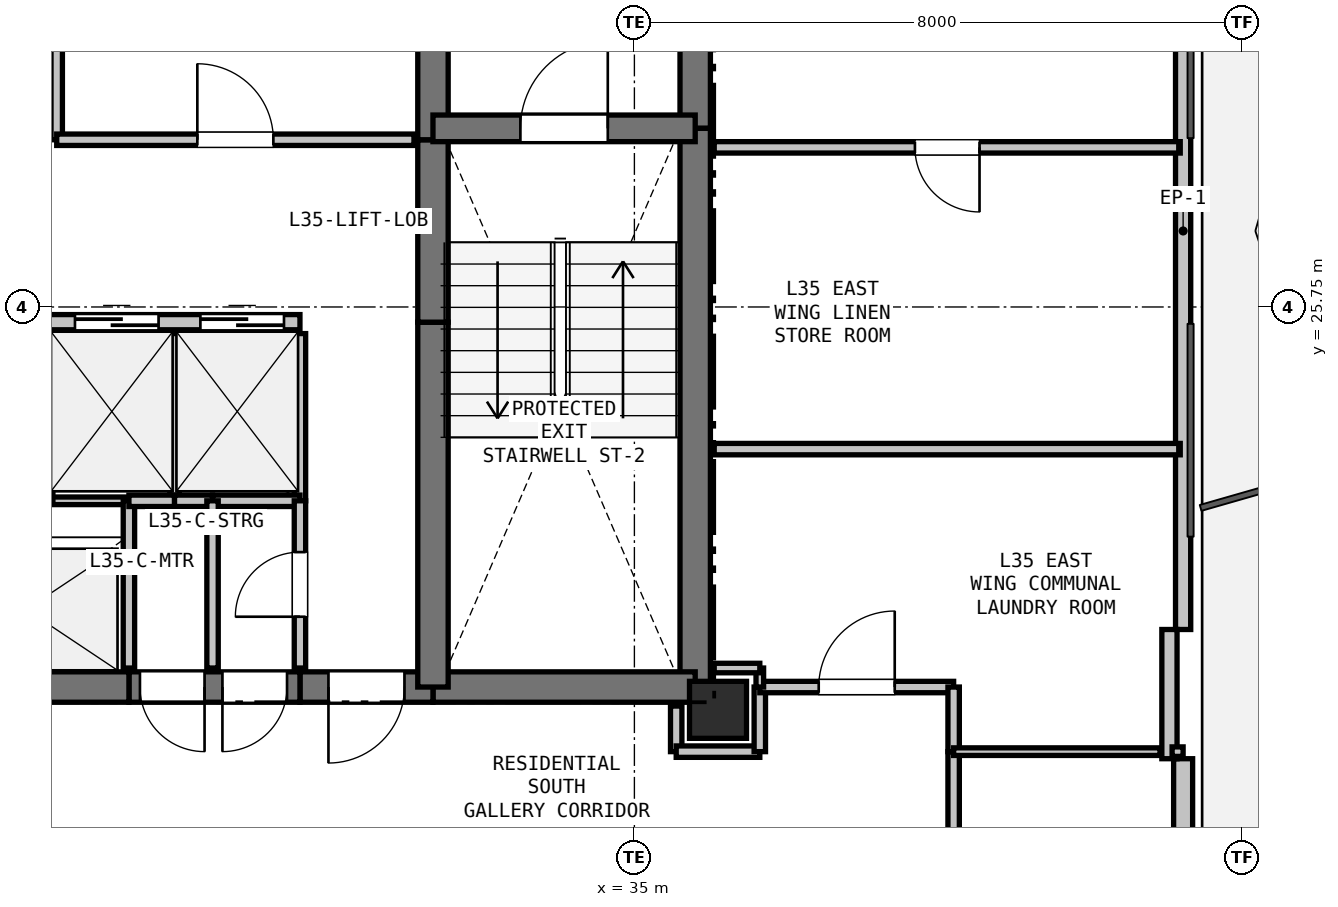
"""IFC4 building model, lengths in metres.
Left out: names, types, materials, properties, quantities, classifications, styles, units other than length and angle.
Written with IfcOpenShell. Run it as: python <this file> out.ifc"""

import sys

from ifc_helpers import new_model, si_unit, direction, frame, frame_2d, origin, origin_2d, place, context, subcontext, project, spatial, rectangle, extrude, element, fill, save


model = new_model("IFC4")
c1 = context("Model", 3, precision=1e-05, world=origin(), true_north=direction((0.0, 1.0)))
c2 = subcontext(c1, "Body", "Model", "MODEL_VIEW")
j1 = project(units=[si_unit("LENGTHUNIT", "METRE"), si_unit("PLANEANGLEUNIT", "RADIAN")], contexts=[c1])
p1 = place(None, origin())
s1 = spatial("IfcSite", under=j1, at=p1, CompositionType="ELEMENT")
p2 = place(p1, origin())
s2 = spatial("IfcBuilding", under=s1, at=p2, CompositionType="ELEMENT")
p3 = place(p2, frame((0.0, 0.0, 127.8)))
s3 = spatial("IfcBuildingStorey", under=s2, at=p3, CompositionType="ELEMENT", Elevation=127.8)
p4 = place(p3, frame((36.1, 20.45, 0.0), z_axis=(0.0, 0.0, 1.0), x_axis=(1.0, 0.0, 0.0)))
e1 = element("IfcColumn", 1, at=p4, inside=s3, PredefinedType="COLUMN", context=c2, shape_type="SweptSolid", body=[
    extrude(rectangle(XDim=0.75, YDim=0.75, at=origin_2d()), origin(), (0.0, 0.0, 1.0), 3.3),
])
p5 = place(p3, frame((42.219, 31.993, 0.0), z_axis=(0.0, 0.0, 1.0), x_axis=(0.0, -1.0, 0.0)))
e2 = element("IfcWall", 2, at=p5, inside=s3, PredefinedType="PARAPET", context=c2, shape_type="SweptSolid", body=[
    extrude(rectangle(XDim=10.486, YDim=0.2, at=frame_2d((5.243, 0.0))), origin(), (0.0, 0.0, 1.0), 0.2),
])
p6 = place(p3, frame((42.219, 19.807, 0.0), z_axis=(0.0, 0.0, 1.0), x_axis=(0.0, -1.0, 0.0)))
e3 = element("IfcWall", 3, at=p6, inside=s3, PredefinedType="SOLIDWALL", context=c2, shape_type="SweptSolid", body=[
    extrude(rectangle(XDim=11.186, YDim=0.25, at=frame_2d((5.593, 0.0))), origin(), (0.0, 0.0, 1.0), 2.68),
])
p7 = place(p6, frame((9.277, 0.0, 0.9)))
e4 = element("IfcOpeningElement", 4, at=p7, cuts=e3, PredefinedType="OPENING", context=c2, shape_type="SweptSolid", body=[
    extrude(rectangle(XDim=1.2, YDim=1.4, at=frame_2d((0.6, 0.7))), frame((0.0, 0.135, 0.0), z_axis=(0.0, -1.0, 0.0), x_axis=(1.0, 0.0, 0.0)), (0.0, 0.0, 1.0), 0.27),
])
p8 = place(p3, frame((42.039, 21.507, 0.0), z_axis=(0.0, 0.0, 1.0), x_axis=(0.0, -1.0, 0.0)))
e5 = element("IfcWall", 5, at=p8, inside=s3, PredefinedType="PARAPET", context=c2, shape_type="SweptSolid", body=[
    extrude(rectangle(XDim=1.7, YDim=0.2, at=frame_2d((0.85, 0.0))), origin(), (0.0, 0.0, 1.0), 2.68),
])
p9 = place(p3, frame((35.8, 32.75, 0.0), z_axis=(0.0, 0.0, 1.0), x_axis=(0.0, -1.0, 0.0)))
e6 = element("IfcWall", 6, at=p9, inside=s3, PredefinedType="SHEAR", context=c2, shape_type="SweptSolid", body=[
    extrude(rectangle(XDim=4.65, YDim=0.4, at=frame_2d((2.325, 0.0))), origin(), (0.0, 0.0, 1.0), 3.06),
])
p10 = place(p3, frame((35.8, 28.1, 0.0), z_axis=(0.0, 0.0, 1.0), x_axis=(0.0, -1.0, 0.0)))
e7 = element("IfcWall", 7, at=p10, inside=s3, PredefinedType="SHEAR", context=c2, shape_type="SweptSolid", body=[
    extrude(rectangle(XDim=7.35, YDim=0.4, at=frame_2d((3.675, 0.0))), origin(), (0.0, 0.0, 1.0), 3.06),
])
p11 = place(p3, frame((35.8, 20.75, 0.0), z_axis=(0.0, 0.0, 1.0), x_axis=(-1.0, 0.0, 0.0)))
e8 = element("IfcWall", 8, at=p11, inside=s3, PredefinedType="SHEAR", context=c2, shape_type="SweptSolid", body=[
    extrude(rectangle(XDim=3.45, YDim=0.4, at=frame_2d((1.725, 0.0))), origin(), (0.0, 0.0, 1.0), 3.06),
])
p12 = place(p3, frame((32.35, 20.75, 0.0), z_axis=(0.0, 0.0, 1.0), x_axis=(-1.0, 0.0, 0.0)))
e9 = element("IfcWall", 9, at=p12, inside=s3, PredefinedType="SHEAR", context=c2, shape_type="SweptSolid", body=[
    extrude(rectangle(XDim=1.75, YDim=0.4, at=frame_2d((0.875, 0.0))), origin(), (0.0, 0.0, 1.0), 3.06),
])
p13 = place(p12, frame((0.375, 0.0, 0.0)))
e10 = element("IfcOpeningElement", 10, at=p13, cuts=e9, PredefinedType="OPENING", context=c2, shape_type="SweptSolid", body=[
    extrude(rectangle(XDim=1.0, YDim=2.15, at=frame_2d((0.5, 1.075))), frame((0.0, 0.21, 0.0), z_axis=(0.0, -1.0, 0.0), x_axis=(1.0, 0.0, 0.0)), (0.0, 0.0, 1.0), 0.42),
])
p14 = place(p3, frame((30.6, 20.75, 0.0), z_axis=(0.0, 0.0, 1.0), x_axis=(-1.0, 0.0, 0.0)))
e11 = element("IfcWall", 11, at=p14, inside=s3, PredefinedType="SHEAR", context=c2, shape_type="SweptSolid", body=[
    extrude(rectangle(XDim=2.25, YDim=0.4, at=frame_2d((1.125, 0.0))), origin(), (0.0, 0.0, 1.0), 3.06),
])
p15 = place(p14, frame((1.255, 0.0, 0.0)))
e12 = element("IfcOpeningElement", 12, at=p15, cuts=e11, PredefinedType="OPENING", context=c2, shape_type="SweptSolid", body=[
    extrude(rectangle(XDim=0.85, YDim=2.1, at=frame_2d((0.425, 1.05))), frame((0.0, 0.21, 0.0), z_axis=(0.0, -1.0, 0.0), x_axis=(1.0, 0.0, 0.0)), (0.0, 0.0, 1.0), 0.42),
])
p16 = place(p14, frame((0.17, 0.0, 0.0)))
e13 = element("IfcOpeningElement", 13, at=p16, cuts=e11, PredefinedType="OPENING", context=c2, shape_type="SweptSolid", body=[
    extrude(rectangle(XDim=0.85, YDim=2.1, at=frame_2d((0.425, 1.05))), frame((0.0, 0.21, 0.0), z_axis=(0.0, -1.0, 0.0), x_axis=(1.0, 0.0, 0.0)), (0.0, 0.0, 1.0), 0.42),
])
p17 = place(p3, frame((28.35, 20.75, 0.0), z_axis=(0.0, 0.0, 1.0), x_axis=(-1.0, 0.0, 0.0)))
e14 = element("IfcWall", 14, at=p17, inside=s3, PredefinedType="SHEAR", context=c2, shape_type="SweptSolid", body=[
    extrude(rectangle(XDim=2.7, YDim=0.4, at=frame_2d((1.35, 0.0))), origin(), (0.0, 0.0, 1.0), 3.06),
])
p18 = place(p3, frame((32.35, 20.75, 0.0), z_axis=(0.0, 0.0, 1.0), x_axis=(0.0, 1.0, 0.0)))
e15 = element("IfcWall", 15, at=p18, inside=s3, PredefinedType="SHEAR", context=c2, shape_type="SweptSolid", body=[
    extrude(rectangle(XDim=4.8, YDim=0.4, at=frame_2d((2.4, 0.0))), origin(), (0.0, 0.0, 1.0), 3.06),
])
p19 = place(p3, frame((32.35, 25.55, 0.0), z_axis=(0.0, 0.0, 1.0), x_axis=(0.0, 1.0, 0.0)))
e16 = element("IfcWall", 16, at=p19, inside=s3, PredefinedType="SHEAR", context=c2, shape_type="SweptSolid", body=[
    extrude(rectangle(XDim=2.4, YDim=0.4, at=frame_2d((1.2, 0.0))), origin(), (0.0, 0.0, 1.0), 3.06),
])
p20 = place(p3, frame((32.35, 27.95, 0.0), z_axis=(0.0, 0.0, 1.0), x_axis=(0.0, 1.0, 0.0)))
e17 = element("IfcWall", 17, at=p20, inside=s3, PredefinedType="SHEAR", context=c2, shape_type="SweptSolid", body=[
    extrude(rectangle(XDim=2.8, YDim=0.4, at=frame_2d((1.4, 0.0))), origin(), (0.0, 0.0, 1.0), 3.06),
])
p21 = place(p3, frame((32.35, 28.1, 0.0), z_axis=(0.0, 0.0, 1.0), x_axis=(1.0, 0.0, 0.0)))
e18 = element("IfcWall", 18, at=p21, inside=s3, PredefinedType="SHEAR", context=c2, shape_type="SweptSolid", body=[
    extrude(rectangle(XDim=3.45, YDim=0.35, at=frame_2d((1.725, 0.0))), origin(), (0.0, 0.0, 1.0), 3.06),
])
p22 = place(p21, frame((1.15, 0.0, 0.0)))
e19 = element("IfcOpeningElement", 19, at=p22, cuts=e18, PredefinedType="OPENING", context=c2, shape_type="SweptSolid", body=[
    extrude(rectangle(XDim=1.15, YDim=2.15, at=frame_2d((0.575, 1.075))), frame((0.0, 0.185, 0.0), z_axis=(0.0, -1.0, 0.0), x_axis=(1.0, 0.0, 0.0)), (0.0, 0.0, 1.0), 0.37),
])
p23 = place(p3, frame((25.65, 25.55, 0.0), z_axis=(0.0, 0.0, 1.0), x_axis=(1.0, 0.0, 0.0)))
e20 = element("IfcWall", 20, at=p23, inside=s3, PredefinedType="PARTITIONING", context=c2, shape_type="SweptSolid", body=[
    extrude(rectangle(XDim=4.95, YDim=0.2, at=frame_2d((2.475, 0.0))), origin(), (0.0, 0.0, 1.0), 3.06),
])
p24 = place(p23, frame((0.34, 0.0, 0.0)))
e21 = element("IfcOpeningElement", 21, at=p24, cuts=e20, PredefinedType="OPENING", context=c2, shape_type="SweptSolid", body=[
    extrude(rectangle(XDim=1.1, YDim=2.15, at=frame_2d((0.55, 1.075))), frame((0.0, 0.11, 0.0), z_axis=(0.0, -1.0, 0.0), x_axis=(1.0, 0.0, 0.0)), (0.0, 0.0, 1.0), 0.22),
])
p25 = place(p23, frame((1.99, 0.0, 0.0)))
e22 = element("IfcOpeningElement", 22, at=p25, cuts=e20, PredefinedType="OPENING", context=c2, shape_type="SweptSolid", body=[
    extrude(rectangle(XDim=1.1, YDim=2.15, at=frame_2d((0.55, 1.075))), frame((0.0, 0.11, 0.0), z_axis=(0.0, -1.0, 0.0), x_axis=(1.0, 0.0, 0.0)), (0.0, 0.0, 1.0), 0.22),
])
p26 = place(p23, frame((3.64, 0.0, 0.0)))
e23 = element("IfcOpeningElement", 23, at=p26, cuts=e20, PredefinedType="OPENING", context=c2, shape_type="SweptSolid", body=[
    extrude(rectangle(XDim=1.1, YDim=2.15, at=frame_2d((0.55, 1.075))), frame((0.0, 0.11, 0.0), z_axis=(0.0, -1.0, 0.0), x_axis=(1.0, 0.0, 0.0)), (0.0, 0.0, 1.0), 0.22),
])
p27 = place(p3, frame((27.3, 23.2, 0.0), z_axis=(0.0, 0.0, 1.0), x_axis=(1.0, 0.0, 0.0)))
e24 = element("IfcWall", 24, at=p27, inside=s3, PredefinedType="PARTITIONING", context=c2, shape_type="SweptSolid", body=[
    extrude(rectangle(XDim=1.05, YDim=0.1, at=frame_2d((0.525, 0.0))), origin(), (0.0, 0.0, 1.0), 3.06),
])
p28 = place(p3, frame((28.35, 23.2, 0.0), z_axis=(0.0, 0.0, 1.0), x_axis=(0.0, -1.0, 0.0)))
e25 = element("IfcWall", 25, at=p28, inside=s3, PredefinedType="PARTITIONING", context=c2, shape_type="SweptSolid", body=[
    extrude(rectangle(XDim=2.2, YDim=0.15, at=frame_2d((1.1, 0.0))), origin(), (0.0, 0.0, 1.0), 3.06),
])
p29 = place(p3, frame((28.95, 25.4, 0.0), z_axis=(0.0, 0.0, 1.0), x_axis=(0.0, -1.0, 0.0)))
e26 = element("IfcWall", 26, at=p29, inside=s3, PredefinedType="PARTITIONING", context=c2, shape_type="SweptSolid", body=[
    extrude(rectangle(XDim=2.2, YDim=0.125, at=frame_2d((1.1, 0.0))), origin(), (0.0, 0.0, 1.0), 3.06),
])
p30 = place(p3, frame((28.95, 23.2, 0.0), z_axis=(0.0, 0.0, 1.0), x_axis=(-1.0, 0.0, 0.0)))
e27 = element("IfcWall", 27, at=p30, inside=s3, PredefinedType="PARTITIONING", context=c2, shape_type="SweptSolid", body=[
    extrude(rectangle(XDim=0.6, YDim=0.15, at=frame_2d((0.3, 0.0))), origin(), (0.0, 0.0, 1.0), 3.06),
])
p31 = place(p3, frame((30.6, 25.4, 0.0), z_axis=(0.0, 0.0, 1.0), x_axis=(0.0, -1.0, 0.0)))
e28 = element("IfcWall", 28, at=p31, inside=s3, PredefinedType="PARTITIONING", context=c2, shape_type="SweptSolid", body=[
    extrude(rectangle(XDim=2.2, YDim=0.15, at=frame_2d((1.1, 0.0))), origin(), (0.0, 0.0, 1.0), 3.06),
])
p32 = place(p3, frame((30.6, 23.2, 0.0), z_axis=(0.0, 0.0, 1.0), x_axis=(-1.0, 0.0, 0.0)))
e29 = element("IfcWall", 29, at=p32, inside=s3, PredefinedType="PARTITIONING", context=c2, shape_type="SweptSolid", body=[
    extrude(rectangle(XDim=1.15, YDim=0.15, at=frame_2d((0.575, 0.0))), origin(), (0.0, 0.0, 1.0), 3.06),
])
p33 = place(p3, frame((29.45, 23.2, 0.0), z_axis=(0.0, 0.0, 1.0), x_axis=(-1.0, 0.0, 0.0)))
e30 = element("IfcWall", 30, at=p33, inside=s3, PredefinedType="PARTITIONING", context=c2, shape_type="SweptSolid", body=[
    extrude(rectangle(XDim=0.5, YDim=0.15, at=frame_2d((0.25, 0.0))), origin(), (0.0, 0.0, 1.0), 3.06),
])
p34 = place(p3, frame((30.6, 21.0, 0.0), z_axis=(0.0, 0.0, 1.0), x_axis=(0.0, 1.0, 0.0)))
e31 = element("IfcWall", 31, at=p34, inside=s3, PredefinedType="PARTITIONING", context=c2, shape_type="SweptSolid", body=[
    extrude(rectangle(XDim=2.2, YDim=0.15, at=frame_2d((1.1, 0.0))), origin(), (0.0, 0.0, 1.0), 3.06),
])
p35 = place(p34, frame((0.675, 0.0, 0.0)))
e32 = element("IfcOpeningElement", 32, at=p35, cuts=e31, PredefinedType="OPENING", context=c2, shape_type="SweptSolid", body=[
    extrude(rectangle(XDim=0.85, YDim=2.1, at=frame_2d((0.425, 1.05))), frame((0.0, 0.085, 0.0), z_axis=(0.0, -1.0, 0.0), x_axis=(1.0, 0.0, 0.0)), (0.0, 0.0, 1.0), 0.17),
])
p36 = place(p3, frame((27.4, 30.3, 0.0), z_axis=(0.0, 0.0, 1.0), x_axis=(0.0, -1.0, 0.0)))
e33 = element("IfcWall", 33, at=p36, inside=s3, PredefinedType="PARTITIONING", context=c2, shape_type="SweptSolid", body=[
    extrude(rectangle(XDim=2.35, YDim=0.15, at=frame_2d((1.175, 0.0))), origin(), (0.0, 0.0, 1.0), 3.06),
])
p37 = place(p3, frame((27.4, 27.95, 0.0), z_axis=(0.0, 0.0, 1.0), x_axis=(1.0, 0.0, 0.0)))
e34 = element("IfcWall", 34, at=p37, inside=s3, PredefinedType="PARTITIONING", context=c2, shape_type="SweptSolid", body=[
    extrude(rectangle(XDim=4.7, YDim=0.15, at=frame_2d((2.35, 0.0))), origin(), (0.0, 0.0, 1.0), 3.06),
])
p38 = place(p37, frame((1.85, 0.0, 0.0)))
e35 = element("IfcOpeningElement", 35, at=p38, cuts=e34, PredefinedType="OPENING", context=c2, shape_type="SweptSolid", body=[
    extrude(rectangle(XDim=1.0, YDim=2.15, at=frame_2d((0.5, 1.075))), frame((0.0, 0.085, 0.0), z_axis=(0.0, -1.0, 0.0), x_axis=(1.0, 0.0, 0.0)), (0.0, 0.0, 1.0), 0.17),
])
p39 = place(p3, frame((35.55, 20.5, 0.0), z_axis=(0.0, 0.0, 1.0), x_axis=(0.0, -1.0, 0.0)))
e36 = element("IfcWall", 36, at=p39, inside=s3, PredefinedType="PARTITIONING", context=c2, shape_type="SweptSolid", body=[
    extrude(rectangle(XDim=0.6, YDim=0.15, at=frame_2d((0.3, 0.0))), origin(), (0.0, 0.0, 1.0), 2.508),
])
p40 = place(p3, frame((35.55, 19.9, 0.0), z_axis=(0.0, 0.0, 1.0), x_axis=(1.0, 0.0, 0.0)))
e37 = element("IfcWall", 37, at=p40, inside=s3, PredefinedType="PARTITIONING", context=c2, shape_type="SweptSolid", body=[
    extrude(rectangle(XDim=1.1, YDim=0.15, at=frame_2d((0.55, 0.0))), origin(), (0.0, 0.0, 1.0), 2.433),
])
p41 = place(p3, frame((36.65, 19.9, 0.0), z_axis=(0.0, 0.0, 1.0), x_axis=(0.0, 1.0, 0.0)))
e38 = element("IfcWall", 38, at=p41, inside=s3, PredefinedType="PARTITIONING", context=c2, shape_type="SweptSolid", body=[
    extrude(rectangle(XDim=0.85, YDim=0.15, at=frame_2d((0.425, 0.0))), origin(), (0.0, 0.0, 1.0), 3.06),
])
p42 = place(p3, frame((36.65, 20.75, 0.0), z_axis=(0.0, 0.0, 1.0), x_axis=(1.0, 0.0, 0.0)))
e39 = element("IfcWall", 39, at=p42, inside=s3, PredefinedType="PARTITIONING", context=c2, shape_type="SweptSolid", body=[
    extrude(rectangle(XDim=2.55, YDim=0.15, at=frame_2d((1.275, 0.0))), origin(), (0.0, 0.0, 1.0), 3.06),
])
p43 = place(p42, frame((0.775, 0.0, 0.0)))
e40 = element("IfcOpeningElement", 40, at=p43, cuts=e39, PredefinedType="OPENING", context=c2, shape_type="SweptSolid", body=[
    extrude(rectangle(XDim=1.0, YDim=2.15, at=frame_2d((0.5, 1.075))), frame((0.0, 0.085, 0.0), z_axis=(0.0, -1.0, 0.0), x_axis=(1.0, 0.0, 0.0)), (0.0, 0.0, 1.0), 0.17),
])
p44 = place(p3, frame((39.2, 20.75, 0.0), z_axis=(0.0, 0.0, 1.0), x_axis=(0.0, -1.0, 0.0)))
e41 = element("IfcWall", 41, at=p44, inside=s3, PredefinedType="PARTITIONING", context=c2, shape_type="SweptSolid", body=[
    extrude(rectangle(XDim=0.85, YDim=0.15, at=frame_2d((0.425, 0.0))), origin(), (0.0, 0.0, 1.0), 3.06),
])
p45 = place(p3, frame((39.2, 19.9, 0.0), z_axis=(0.0, 0.0, 1.0), x_axis=(0.0, -1.0, 0.0)))
e42 = element("IfcWall", 42, at=p45, inside=s3, PredefinedType="PARTITIONING", context=c2, shape_type="SweptSolid", body=[
    extrude(rectangle(XDim=1.75, YDim=0.15, at=frame_2d((0.875, 0.0))), origin(), (0.0, 0.0, 1.0), 3.06),
])
p46 = place(p3, frame((29.45, 23.2, 0.0), z_axis=(0.0, 0.0, 1.0), x_axis=(0.0, -1.0, 0.0)))
e43 = element("IfcWall", 43, at=p46, inside=s3, PredefinedType="PARTITIONING", context=c2, shape_type="SweptSolid", body=[
    extrude(rectangle(XDim=2.2, YDim=0.15, at=frame_2d((1.1, 0.0))), origin(), (0.0, 0.0, 1.0), 3.06),
])
p47 = place(p3, frame((42.181, 27.85, 0.0), z_axis=(0.0, 0.0, 1.0), x_axis=(-1.0, 0.0, 0.0)))
e44 = element("IfcWall", 44, at=p47, inside=s3, PredefinedType="PARTITIONING", context=c2, shape_type="SweptSolid", body=[
    extrude(rectangle(XDim=6.131, YDim=0.15, at=frame_2d((3.065, 0.0))), origin(), (0.0, 0.0, 1.0), 2.365),
])
p48 = place(p47, frame((2.641, 0.0, 0.0)))
e45 = element("IfcOpeningElement", 45, at=p48, cuts=e44, PredefinedType="OPENING", context=c2, shape_type="SweptSolid", body=[
    extrude(rectangle(XDim=0.85, YDim=2.1, at=frame_2d((0.425, 1.05))), frame((0.0, 0.085, 0.0), z_axis=(0.0, -1.0, 0.0), x_axis=(1.0, 0.0, 0.0)), (0.0, 0.0, 1.0), 0.17),
])
p49 = place(p3, frame((36.65, 20.75, 0.0), z_axis=(0.0, 0.0, 1.0), x_axis=(0.0, 1.0, 0.0)))
e46 = element("IfcWall", 46, at=p49, inside=s3, PredefinedType="PARTITIONING", context=c2, shape_type="SweptSolid", body=[
    extrude(rectangle(XDim=0.25, YDim=0.1, at=frame_2d((0.125, 0.0))), origin(), (0.0, 0.0, 1.0), 3.06),
])
p50 = place(p3, frame((36.65, 21.0, 0.0), z_axis=(0.0, 0.0, 1.0), x_axis=(-1.0, 0.0, 0.0)))
e47 = element("IfcWall", 47, at=p50, inside=s3, PredefinedType="PARTITIONING", context=c2, shape_type="SweptSolid", body=[
    extrude(rectangle(XDim=0.6, YDim=0.125, at=frame_2d((0.3, 0.0))), origin(), (0.0, 0.0, 1.0), 2.508),
])
p51 = place(p3, frame((36.05, 23.88, 0.0), z_axis=(0.0, 0.0, 1.0), x_axis=(1.0, 0.0, 0.0)))
e48 = element("IfcWall", 48, at=p51, inside=s3, PredefinedType="PARTITIONING", context=c2, shape_type="SweptSolid", body=[
    extrude(rectangle(XDim=6.131, YDim=0.15, at=frame_2d((3.065, 0.0))), origin(), (0.0, 0.0, 1.0), 2.365),
])
p52 = place(p3, frame((42.219, 19.9, 0.0), z_axis=(0.0, 0.0, 1.0), x_axis=(-1.0, 0.0, 0.0)))
e49 = element("IfcWall", 49, at=p52, inside=s3, PredefinedType="PARTITIONING", context=c2, shape_type="SweptSolid", body=[
    extrude(rectangle(XDim=0.145, YDim=0.125, at=frame_2d((0.072, 0.0))), origin(), (0.0, 0.0, 1.0), 3.06),
])
p53 = place(p3, frame((41.915, 19.9, 0.0), z_axis=(0.0, 0.0, 1.0), x_axis=(-1.0, 0.0, 0.0)))
e50 = element("IfcWall", 50, at=p53, inside=s3, PredefinedType="PARTITIONING", context=c2, shape_type="SweptSolid", body=[
    extrude(rectangle(XDim=2.715, YDim=0.1, at=frame_2d((1.358, 0.0))), origin(), (0.0, 0.0, 1.0), 2.365),
])
p54 = place(p25, origin())
e51 = element("IfcDoor", 51, at=p54, inside=s3, OperationType="SLIDING_TO_LEFT", PredefinedType="DOOR", context=c2, shape_type="SweptSolid", body=[
    extrude(rectangle(XDim=1.1, YDim=2.15, at=frame_2d((0.55, 1.075))), frame((0.0, 0.025, 0.0), z_axis=(0.0, -1.0, 0.0), x_axis=(1.0, 0.0, 0.0)), (0.0, 0.0, 1.0), 0.05),
])
fill(e22, e51)
p55 = place(p26, origin())
e52 = element("IfcDoor", 52, at=p55, inside=s3, OperationType="SLIDING_TO_LEFT", PredefinedType="DOOR", context=c2, shape_type="SweptSolid", body=[
    extrude(rectangle(XDim=1.1, YDim=2.15, at=frame_2d((0.55, 1.075))), frame((0.0, 0.025, 0.0), z_axis=(0.0, -1.0, 0.0), x_axis=(1.0, 0.0, 0.0)), (0.0, 0.0, 1.0), 0.05),
])
fill(e23, e52)
p56 = place(p13, origin())
e53 = element("IfcDoor", 53, at=p56, inside=s3, OperationType="SINGLE_SWING_RIGHT", PredefinedType="DOOR", context=c2, shape_type="SweptSolid", body=[
    extrude(rectangle(XDim=1.0, YDim=2.15, at=frame_2d((0.5, 1.075))), frame((0.0, 0.025, 0.0), z_axis=(0.0, -1.0, 0.0), x_axis=(1.0, 0.0, 0.0)), (0.0, 0.0, 1.0), 0.05),
])
fill(e10, e53)
p57 = place(p22, origin())
e54 = element("IfcDoor", 54, at=p57, inside=s3, OperationType="SINGLE_SWING_RIGHT", PredefinedType="DOOR", context=c2, shape_type="SweptSolid", body=[
    extrude(rectangle(XDim=1.15, YDim=2.15, at=frame_2d((0.575, 1.075))), frame((0.0, 0.025, 0.0), z_axis=(0.0, -1.0, 0.0), x_axis=(1.0, 0.0, 0.0)), (0.0, 0.0, 1.0), 0.05),
])
fill(e19, e54)
p58 = place(p38, origin())
e55 = element("IfcDoor", 55, at=p58, inside=s3, OperationType="SINGLE_SWING_LEFT", PredefinedType="DOOR", context=c2, shape_type="SweptSolid", body=[
    extrude(rectangle(XDim=1.0, YDim=2.15, at=frame_2d((0.5, 1.075))), frame((0.0, 0.025, 0.0), z_axis=(0.0, -1.0, 0.0), x_axis=(1.0, 0.0, 0.0)), (0.0, 0.0, 1.0), 0.05),
])
fill(e35, e55)
p59 = place(p35, origin())
e56 = element("IfcDoor", 56, at=p59, inside=s3, OperationType="SINGLE_SWING_LEFT", PredefinedType="DOOR", context=c2, shape_type="SweptSolid", body=[
    extrude(rectangle(XDim=0.85, YDim=2.1, at=frame_2d((0.425, 1.05))), frame((0.0, 0.025, 0.0), z_axis=(0.0, -1.0, 0.0), x_axis=(1.0, 0.0, 0.0)), (0.0, 0.0, 1.0), 0.05),
])
fill(e32, e56)
p60 = place(p15, origin())
e57 = element("IfcDoor", 57, at=p60, inside=s3, OperationType="SINGLE_SWING_LEFT", PredefinedType="DOOR", context=c2, shape_type="SweptSolid", body=[
    extrude(rectangle(XDim=0.85, YDim=2.1, at=frame_2d((0.425, 1.05))), frame((0.0, 0.025, 0.0), z_axis=(0.0, -1.0, 0.0), x_axis=(1.0, 0.0, 0.0)), (0.0, 0.0, 1.0), 0.05),
])
fill(e12, e57)
p61 = place(p16, origin())
e58 = element("IfcDoor", 58, at=p61, inside=s3, OperationType="SINGLE_SWING_RIGHT", PredefinedType="DOOR", context=c2, shape_type="SweptSolid", body=[
    extrude(rectangle(XDim=0.85, YDim=2.1, at=frame_2d((0.425, 1.05))), frame((0.0, 0.025, 0.0), z_axis=(0.0, -1.0, 0.0), x_axis=(1.0, 0.0, 0.0)), (0.0, 0.0, 1.0), 0.05),
])
fill(e13, e58)
p62 = place(p43, origin())
e59 = element("IfcDoor", 59, at=p62, inside=s3, OperationType="SINGLE_SWING_RIGHT", PredefinedType="DOOR", context=c2, shape_type="SweptSolid", body=[
    extrude(rectangle(XDim=1.0, YDim=2.15, at=frame_2d((0.5, 1.075))), frame((0.0, 0.025, 0.0), z_axis=(0.0, -1.0, 0.0), x_axis=(1.0, 0.0, 0.0)), (0.0, 0.0, 1.0), 0.05),
])
fill(e40, e59)
p63 = place(p48, origin())
e60 = element("IfcDoor", 60, at=p63, inside=s3, OperationType="SINGLE_SWING_LEFT", PredefinedType="DOOR", context=c2, shape_type="SweptSolid", body=[
    extrude(rectangle(XDim=0.85, YDim=2.1, at=frame_2d((0.425, 1.05))), frame((0.0, 0.025, 0.0), z_axis=(0.0, -1.0, 0.0), x_axis=(1.0, 0.0, 0.0)), (0.0, 0.0, 1.0), 0.05),
])
fill(e45, e60)
save(model, sys.argv[1])
